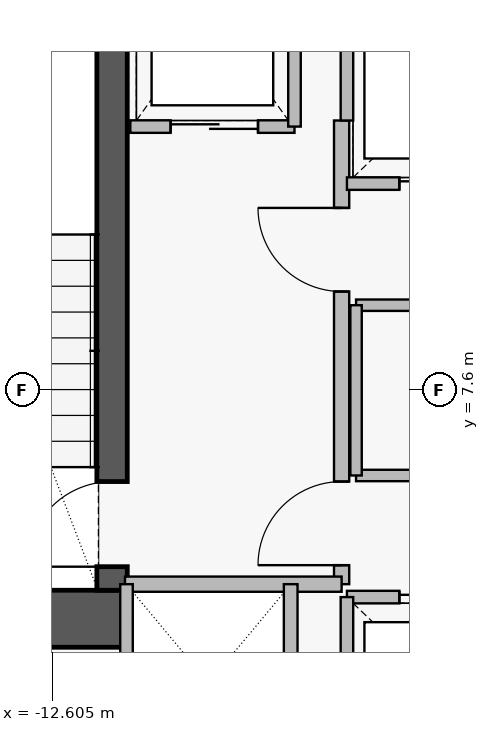
"""IFC4 building model, lengths in metres.
Left out: names, types, materials, properties, quantities, classifications, styles, units other than length and angle.
Written with IfcOpenShell. Run it as: python <this file> out.ifc"""

import sys

from ifc_helpers import new_model, si_unit, direction, frame, frame_2d, origin, place, context, subcontext, project, spatial, rectangle, extrude, element, fill, save


model = new_model("IFC4")
c1 = context("Model", 3, precision=1e-05, world=origin(), true_north=direction((0.0, 1.0)))
c2 = subcontext(c1, "Body", "Model", "MODEL_VIEW")
j1 = project(units=[si_unit("LENGTHUNIT", "METRE"), si_unit("PLANEANGLEUNIT", "RADIAN")], contexts=[c1])
p1 = place(None, origin())
s1 = spatial("IfcSite", under=j1, at=p1, CompositionType="ELEMENT")
p2 = place(p1, origin())
s2 = spatial("IfcBuilding", under=s1, at=p2, CompositionType="ELEMENT")
p3 = place(p2, frame((0.0, 0.0, 106.6)))
s3 = spatial("IfcBuildingStorey", under=s2, at=p3, CompositionType="ELEMENT", Elevation=106.6)
p4 = place(p3, frame((-16.16, 4.595, 0.0), z_axis=(0.0, 0.0, 1.0), x_axis=(1.0, 0.0, 0.0)))
e1 = element("IfcWall", 1, at=p4, inside=s3, PredefinedType="SHEAR", context=c2, shape_type="SweptSolid", body=[
    extrude(rectangle(XDim=4.56, YDim=0.75, at=frame_2d((2.28, 0.0))), origin(), (0.0, 0.0, 1.0), 3.46),
])
p5 = place(p3, frame((-11.82, 4.97, 0.0), z_axis=(0.0, 0.0, 1.0), x_axis=(0.0, 1.0, 0.0)))
e2 = element("IfcWall", 2, at=p5, inside=s3, PredefinedType="SHEAR", context=c2, shape_type="SweptSolid", body=[
    extrude(rectangle(XDim=8.96, YDim=0.4, at=frame_2d((4.48, 0.0))), origin(), (0.0, 0.0, 1.0), 3.46),
])
p6 = place(p5, frame((0.31, 0.0, 0.0)))
e3 = element("IfcOpeningElement", 3, at=p6, cuts=e2, PredefinedType="OPENING", context=c2, shape_type="SweptSolid", body=[
    extrude(rectangle(XDim=1.12, YDim=2.22, at=frame_2d((0.56, 1.11))), frame((0.0, 0.21, 0.0), z_axis=(0.0, -1.0, 0.0), x_axis=(1.0, 0.0, 0.0)), (0.0, 0.0, 1.0), 0.42),
])
p7 = place(p3, frame((-8.8, 5.05, 0.0), z_axis=(0.0, 0.0, 1.0), x_axis=(0.0, 1.0, 0.0)))
e4 = element("IfcWall", 4, at=p7, inside=s3, PredefinedType="PARTITIONING", context=c2, shape_type="SweptSolid", body=[
    extrude(rectangle(XDim=6.1, YDim=0.2, at=frame_2d((3.05, 0.0))), origin(), (0.0, 0.0, 1.0), 3.43),
])
p8 = place(p7, frame((0.25, 0.0, 0.0)))
e5 = element("IfcOpeningElement", 5, at=p8, cuts=e4, PredefinedType="OPENING", context=c2, shape_type="SweptSolid", body=[
    extrude(rectangle(XDim=1.1, YDim=2.2, at=frame_2d((0.55, 1.1))), frame((0.0, 0.11, 0.0), z_axis=(0.0, -1.0, 0.0), x_axis=(1.0, 0.0, 0.0)), (0.0, 0.0, 1.0), 0.22),
])
p9 = place(p7, frame((3.85, 0.0, 0.0)))
e6 = element("IfcOpeningElement", 6, at=p9, cuts=e4, PredefinedType="OPENING", context=c2, shape_type="SweptSolid", body=[
    extrude(rectangle(XDim=1.1, YDim=2.2, at=frame_2d((0.55, 1.1))), frame((0.0, 0.11, 0.0), z_axis=(0.0, -1.0, 0.0), x_axis=(1.0, 0.0, 0.0)), (0.0, 0.0, 1.0), 0.22),
])
p10 = place(p3, frame((-11.58, 11.07, 0.0), z_axis=(0.0, 0.0, 1.0), x_axis=(1.0, 0.0, 0.0)))
e7 = element("IfcWall", 7, at=p10, inside=s3, PredefinedType="PARTITIONING", context=c2, shape_type="SweptSolid", body=[
    extrude(rectangle(XDim=2.16, YDim=0.165, at=frame_2d((1.08, 0.0))), origin(), (0.0, 0.0, 1.0), 3.43),
])
p11 = place(p10, frame((0.53, 0.0, 0.0)))
e8 = element("IfcOpeningElement", 8, at=p11, cuts=e7, PredefinedType="OPENING", context=c2, shape_type="SweptSolid", body=[
    extrude(rectangle(XDim=1.15, YDim=2.25, at=frame_2d((0.575, 1.125))), frame((0.0, 0.093, 0.0), z_axis=(0.0, -1.0, 0.0), x_axis=(1.0, 0.0, 0.0)), (0.0, 0.0, 1.0), 0.185),
])
p12 = place(p3, frame((-8.73, 4.88, 0.0), z_axis=(0.0, 0.0, 1.0), x_axis=(1.0, 0.0, 0.0)))
e9 = element("IfcWall", 9, at=p12, inside=s3, PredefinedType="PARTITIONING", context=c2, shape_type="SweptSolid", body=[
    extrude(rectangle(XDim=2.48, YDim=0.165, at=frame_2d((1.24, 0.0))), origin(), (0.0, 0.0, 1.0), 3.43),
])
p13 = place(p12, frame((0.69, 0.0, 0.0)))
e10 = element("IfcOpeningElement", 10, at=p13, cuts=e9, PredefinedType="OPENING", context=c2, shape_type="SweptSolid", body=[
    extrude(rectangle(XDim=1.1, YDim=2.25, at=frame_2d((0.55, 1.125))), frame((0.0, 0.093, 0.0), z_axis=(0.0, -1.0, 0.0), x_axis=(1.0, 0.0, 0.0)), (0.0, 0.0, 1.0), 0.185),
])
p14 = place(p3, frame((-8.73, 10.32, 0.0), z_axis=(0.0, 0.0, 1.0), x_axis=(1.0, 0.0, 0.0)))
e11 = element("IfcWall", 11, at=p14, inside=s3, PredefinedType="PARTITIONING", context=c2, shape_type="SweptSolid", body=[
    extrude(rectangle(XDim=2.48, YDim=0.165, at=frame_2d((1.24, 0.0))), origin(), (0.0, 0.0, 1.0), 3.43),
])
p15 = place(p14, frame((0.69, 0.0, 0.0)))
e12 = element("IfcOpeningElement", 12, at=p15, cuts=e11, PredefinedType="OPENING", context=c2, shape_type="SweptSolid", body=[
    extrude(rectangle(XDim=1.1, YDim=2.25, at=frame_2d((0.55, 1.125))), frame((0.0, 0.093, 0.0), z_axis=(0.0, -1.0, 0.0), x_axis=(1.0, 0.0, 0.0)), (0.0, 0.0, 1.0), 0.185),
])
p16 = place(p3, frame((-8.61, 6.48, 0.0), z_axis=(0.0, 0.0, 1.0), x_axis=(1.0, 0.0, 0.0)))
e13 = element("IfcWall", 13, at=p16, inside=s3, PredefinedType="PARTITIONING", context=c2, shape_type="SweptSolid", body=[
    extrude(rectangle(XDim=7.29, YDim=0.15, at=frame_2d((3.645, 0.0))), origin(), (0.0, 0.0, 1.0), 3.43),
])
p17 = place(p16, frame((3.195, 0.0, 0.0)))
e14 = element("IfcOpeningElement", 14, at=p17, cuts=e13, PredefinedType="OPENING", context=c2, shape_type="SweptSolid", body=[
    extrude(rectangle(XDim=0.9, YDim=2.15, at=frame_2d((0.45, 1.075))), frame((0.0, 0.085, 0.0), z_axis=(0.0, -1.0, 0.0), x_axis=(1.0, 0.0, 0.0)), (0.0, 0.0, 1.0), 0.17),
])
p18 = place(p3, frame((-11.65, 5.05, 0.0), z_axis=(0.0, 0.0, 1.0), x_axis=(1.0, 0.0, 0.0)))
e15 = element("IfcWall", 15, at=p18, inside=s3, PredefinedType="PARTITIONING", context=c2, shape_type="SweptSolid", body=[
    extrude(rectangle(XDim=2.85, YDim=0.2, at=frame_2d((1.425, 0.0))), origin(), (0.0, 0.0, 1.0), 3.43),
])
p19 = place(p3, frame((-9.42, 11.07, 0.0), z_axis=(0.0, 0.0, 1.0), x_axis=(0.0, 1.0, 0.0)))
e16 = element("IfcWall", 16, at=p19, inside=s3, PredefinedType="PARTITIONING", context=c2, shape_type="SweptSolid", body=[
    extrude(rectangle(XDim=2.96, YDim=0.165, at=frame_2d((1.48, 0.0))), origin(), (0.0, 0.0, 1.0), 3.43),
])
p20 = place(p3, frame((-8.73, 2.52, 0.0), z_axis=(0.0, 0.0, 1.0), x_axis=(0.0, 1.0, 0.0)))
e17 = element("IfcWall", 17, at=p20, inside=s3, PredefinedType="PARTITIONING", context=c2, shape_type="SweptSolid", body=[
    extrude(rectangle(XDim=2.36, YDim=0.165, at=frame_2d((1.18, 0.0))), origin(), (0.0, 0.0, 1.0), 3.43),
])
p21 = place(p3, frame((-8.73, 11.15, 0.0), z_axis=(0.0, 0.0, 1.0), x_axis=(0.0, 1.0, 0.0)))
e18 = element("IfcWall", 18, at=p21, inside=s3, PredefinedType="PARTITIONING", context=c2, shape_type="SweptSolid", body=[
    extrude(rectangle(XDim=1.53, YDim=0.165, at=frame_2d((0.765, 0.0))), origin(), (0.0, 0.0, 1.0), 3.43),
])
p22 = place(p3, frame((-9.47, 2.45, 0.0), z_axis=(0.0, 0.0, 1.0), x_axis=(0.0, 1.0, 0.0)))
e19 = element("IfcWall", 19, at=p22, inside=s3, PredefinedType="PARTITIONING", context=c2, shape_type="SweptSolid", body=[
    extrude(rectangle(XDim=2.6, YDim=0.18, at=frame_2d((1.3, 0.0))), origin(), (0.0, 0.0, 1.0), 3.43),
])
p23 = place(p3, frame((-11.63, 2.47, 0.0), z_axis=(0.0, 0.0, 1.0), x_axis=(0.0, 1.0, 0.0)))
e20 = element("IfcWall", 20, at=p23, inside=s3, PredefinedType="PARTITIONING", context=c2, shape_type="SweptSolid", body=[
    extrude(rectangle(XDim=2.58, YDim=0.165, at=frame_2d((1.29, 0.0))), origin(), (0.0, 0.0, 1.0), 3.43),
])
p24 = place(p3, frame((-8.61, 8.72, 0.0), z_axis=(0.0, 0.0, 1.0), x_axis=(1.0, 0.0, 0.0)))
e21 = element("IfcWall", 21, at=p24, inside=s3, PredefinedType="PARTITIONING", context=c2, shape_type="SweptSolid", body=[
    extrude(rectangle(XDim=7.29, YDim=0.15, at=frame_2d((3.645, 0.0))), origin(), (0.0, 0.0, 1.0), 3.43),
])
p25 = place(p3, frame((-8.61, 6.48, 0.0), z_axis=(0.0, 0.0, 1.0), x_axis=(0.0, 1.0, 0.0)))
e22 = element("IfcWall", 22, at=p25, inside=s3, PredefinedType="PARTITIONING", context=c2, shape_type="SweptSolid", body=[
    extrude(rectangle(XDim=2.24, YDim=0.15, at=frame_2d((1.12, 0.0))), origin(), (0.0, 0.0, 1.0), 3.43),
])
p26 = place(p6, origin())
e23 = element("IfcDoor", 23, at=p26, inside=s3, OperationType="SINGLE_SWING_LEFT", PredefinedType="DOOR", context=c2, shape_type="SweptSolid", body=[
    extrude(rectangle(XDim=1.12, YDim=2.22, at=frame_2d((0.56, 1.11))), frame((0.0, 0.025, 0.0), z_axis=(0.0, -1.0, 0.0), x_axis=(1.0, 0.0, 0.0)), (0.0, 0.0, 1.0), 0.05),
])
fill(e3, e23)
p27 = place(p8, origin())
e24 = element("IfcDoor", 24, at=p27, inside=s3, OperationType="SINGLE_SWING_LEFT", PredefinedType="DOOR", context=c2, shape_type="SweptSolid", body=[
    extrude(rectangle(XDim=1.1, YDim=2.2, at=frame_2d((0.55, 1.1))), frame((0.0, 0.025, 0.0), z_axis=(0.0, -1.0, 0.0), x_axis=(1.0, 0.0, 0.0)), (0.0, 0.0, 1.0), 0.05),
])
fill(e5, e24)
p28 = place(p9, origin())
e25 = element("IfcDoor", 25, at=p28, inside=s3, OperationType="SINGLE_SWING_RIGHT", PredefinedType="DOOR", context=c2, shape_type="SweptSolid", body=[
    extrude(rectangle(XDim=1.1, YDim=2.2, at=frame_2d((0.55, 1.1))), frame((0.0, 0.025, 0.0), z_axis=(0.0, -1.0, 0.0), x_axis=(1.0, 0.0, 0.0)), (0.0, 0.0, 1.0), 0.05),
])
fill(e6, e25)
p29 = place(p11, origin())
e26 = element("IfcDoor", 26, at=p29, inside=s3, OperationType="SLIDING_TO_LEFT", PredefinedType="DOOR", context=c2, shape_type="SweptSolid", body=[
    extrude(rectangle(XDim=1.15, YDim=2.25, at=frame_2d((0.575, 1.125))), frame((0.0, 0.025, 0.0), z_axis=(0.0, -1.0, 0.0), x_axis=(1.0, 0.0, 0.0)), (0.0, 0.0, 1.0), 0.05),
])
fill(e8, e26)
p30 = place(p13, origin())
e27 = element("IfcDoor", 27, at=p30, inside=s3, OperationType="SLIDING_TO_LEFT", PredefinedType="DOOR", context=c2, shape_type="SweptSolid", body=[
    extrude(rectangle(XDim=1.1, YDim=2.25, at=frame_2d((0.55, 1.125))), frame((0.0, 0.025, 0.0), z_axis=(0.0, -1.0, 0.0), x_axis=(1.0, 0.0, 0.0)), (0.0, 0.0, 1.0), 0.05),
])
fill(e10, e27)
p31 = place(p15, origin())
e28 = element("IfcDoor", 28, at=p31, inside=s3, OperationType="SLIDING_TO_LEFT", PredefinedType="DOOR", context=c2, shape_type="SweptSolid", body=[
    extrude(rectangle(XDim=1.1, YDim=2.25, at=frame_2d((0.55, 1.125))), frame((0.0, 0.025, 0.0), z_axis=(0.0, -1.0, 0.0), x_axis=(1.0, 0.0, 0.0)), (0.0, 0.0, 1.0), 0.05),
])
fill(e12, e28)
save(model, sys.argv[1])
